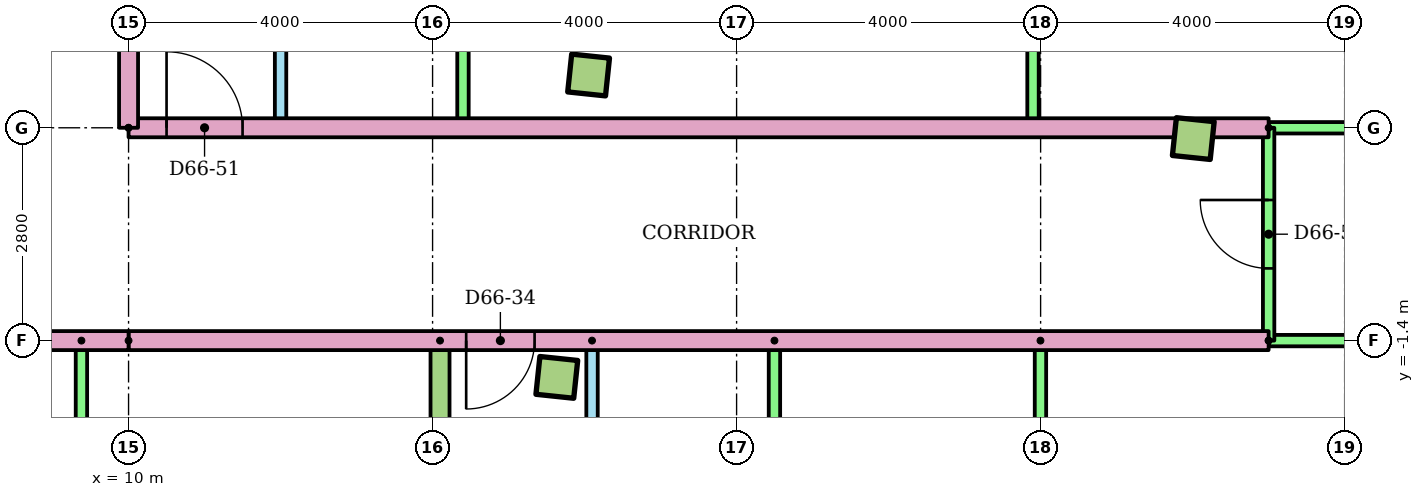
"""IFC4 building model, lengths in metres.
Left out: names, types, materials, properties, quantities, classifications, styles, units other than length and angle.
Written with IfcOpenShell. Run it as: python <this file> out.ifc"""

import sys

from ifc_helpers import new_model, si_unit, direction, frame, frame_2d, origin, origin_2d, place, context, subcontext, project, spatial, rectangle, extrude, element, fill, save


model = new_model("IFC4")
c1 = context("Model", 3, precision=1e-05, world=origin(), true_north=direction((0.0, 1.0)))
c2 = subcontext(c1, "Body", "Model", "MODEL_VIEW")
j1 = project(units=[si_unit("LENGTHUNIT", "METRE"), si_unit("PLANEANGLEUNIT", "RADIAN")], contexts=[c1])
p1 = place(None, origin())
s1 = spatial("IfcSite", under=j1, at=p1, CompositionType="ELEMENT")
p2 = place(p1, origin())
s2 = spatial("IfcBuilding", under=s1, at=p2, CompositionType="ELEMENT")
p3 = place(p2, frame((0.0, 0.0, 256.3)))
s3 = spatial("IfcBuildingStorey", under=s2, at=p3, CompositionType="ELEMENT", Elevation=256.3)
for number, where, z_axis, x_axis in (
    (1, (15.635, -1.884, 0.0), (0.0, 0.0, 1.0), (0.995, -0.105, 0.0)),
    (2, (16.053, 2.094, 0.0), (0.0, 0.0, 1.0), (0.995, -0.105, 0.0)),
    (3, (24.009, 1.258, 0.0), (0.0, 0.0, 1.0), (0.995, -0.105, 0.0)),
):
    element("IfcColumn", number, at=place(p3, frame(where, z_axis=z_axis, x_axis=x_axis)), inside=s3, PredefinedType="COLUMN", context=c2, shape_type="SweptSolid", body=[
        extrude(rectangle(XDim=0.5, YDim=0.5, at=origin_2d()), origin(), (0.0, 0.0, 1.0), 3.2),
    ])
p4 = place(p3, frame((9.38, -1.4, 0.0), z_axis=(0.0, 0.0, 1.0), x_axis=(0.0, -1.0, 0.0)))
e4 = element("IfcWall", 4, at=p4, inside=s3, PredefinedType="PARTITIONING", context=c2, shape_type="SweptSolid", body=[
    extrude(rectangle(XDim=6.075, YDim=0.15, at=frame_2d((3.037, 0.0))), origin(), (0.0, 0.0, 1.0), 2.4),
])
p5 = place(p3, frame((16.098, -1.4, 0.0), z_axis=(0.0, 0.0, 1.0), x_axis=(0.0, -1.0, 0.0)))
e5 = element("IfcWall", 5, at=p5, inside=s3, PredefinedType="PARTITIONING", context=c2, shape_type="SweptSolid", body=[
    extrude(rectangle(XDim=7.782, YDim=0.15, at=frame_2d((3.891, 0.0))), origin(), (0.0, 0.0, 1.0), 2.4),
])
p6 = place(p5, frame((1.675, 0.0, 0.0)))
e6 = element("IfcOpeningElement", 6, at=p6, cuts=e5, PredefinedType="OPENING", context=c2, shape_type="SweptSolid", body=[
    extrude(rectangle(XDim=0.9, YDim=2.1, at=frame_2d((0.45, 1.05))), frame((0.0, 0.085, 0.0), z_axis=(0.0, -1.0, 0.0), x_axis=(1.0, 0.0, 0.0)), (0.0, 0.0, 1.0), 0.17),
])
p7 = place(p5, frame((5.616, 0.0, 0.0)))
e7 = element("IfcOpeningElement", 7, at=p7, cuts=e5, PredefinedType="OPENING", context=c2, shape_type="SweptSolid", body=[
    extrude(rectangle(XDim=0.8, YDim=2.1, at=frame_2d((0.4, 1.05))), frame((0.0, 0.085, 0.0), z_axis=(0.0, -1.0, 0.0), x_axis=(1.0, 0.0, 0.0)), (0.0, 0.0, 1.0), 0.17),
])
for number, where, z_axis, x_axis in (
    (8, (18.498, -1.4, 0.0), (0.0, 0.0, 1.0), (0.0, -1.0, 0.0)),
    (9, (21.998, -1.4, 0.0), (0.0, 0.0, 1.0), (0.0, -1.0, 0.0)),
):
    element("IfcWall", number, at=place(p3, frame(where, z_axis=z_axis, x_axis=x_axis)), inside=s3, PredefinedType="PARTITIONING", context=c2, shape_type="SweptSolid", body=[
        extrude(rectangle(XDim=7.782, YDim=0.15, at=frame_2d((3.891, 0.0))), origin(), (0.0, 0.0, 1.0), 2.4),
    ])
p8 = place(p3, frame((14.098, -1.4, 0.0), z_axis=(0.0, 0.0, 1.0), x_axis=(0.0, -1.0, 0.0)))
e10 = element("IfcWall", 10, at=p8, inside=s3, PredefinedType="PARTITIONING", context=c2, shape_type="SweptSolid", body=[
    extrude(rectangle(XDim=15.013, YDim=0.25, at=frame_2d((7.506, 0.0))), origin(), (0.0, 0.0, 1.0), 2.4),
])
p9 = place(p3, frame((25.0, -1.4, 0.0), z_axis=(0.0, 0.0, 1.0), x_axis=(-1.0, 0.0, 0.0)))
e11 = element("IfcWall", 11, at=p9, inside=s3, PredefinedType="PARTITIONING", context=c2, shape_type="SweptSolid", body=[
    extrude(rectangle(XDim=15.0, YDim=0.25, at=frame_2d((7.5, 0.0))), origin(), (0.0, 0.0, 1.0), 2.4),
])
p10 = place(p9, frame((9.658, 0.0, 0.0)))
e12 = element("IfcOpeningElement", 12, at=p10, cuts=e11, PredefinedType="OPENING", context=c2, shape_type="SweptSolid", body=[
    extrude(rectangle(XDim=0.9, YDim=2.1, at=frame_2d((0.45, 1.05))), frame((0.0, 0.135, 0.0), z_axis=(0.0, -1.0, 0.0), x_axis=(1.0, 0.0, 0.0)), (0.0, 0.0, 1.0), 0.27),
])
p11 = place(p3, frame((30.798, -1.4, 0.0), z_axis=(0.0, 0.0, 1.0), x_axis=(-1.0, 0.0, 0.0)))
e13 = element("IfcWall", 13, at=p11, inside=s3, PredefinedType="PARTITIONING", context=c2, shape_type="SweptSolid", body=[
    extrude(rectangle(XDim=5.798, YDim=0.15, at=frame_2d((2.899, 0.0))), origin(), (0.0, 0.0, 1.0), 2.4),
])
p12 = place(p3, frame((12.0, 10.943, 0.0), z_axis=(0.0, 0.0, 1.0), x_axis=(0.0, -1.0, 0.0)))
e14 = element("IfcWall", 14, at=p12, inside=s3, PredefinedType="PARTITIONING", context=c2, shape_type="SweptSolid", body=[
    extrude(rectangle(XDim=9.543, YDim=0.15, at=frame_2d((4.772, 0.0))), origin(), (0.0, 0.0, 1.0), 2.4),
])
p13 = place(p12, frame((6.469, 0.0, 0.0)))
e15 = element("IfcOpeningElement", 15, at=p13, cuts=e14, PredefinedType="OPENING", context=c2, shape_type="SweptSolid", body=[
    extrude(rectangle(XDim=0.9, YDim=2.1, at=frame_2d((0.45, 1.05))), frame((0.0, 0.085, 0.0), z_axis=(0.0, -1.0, 0.0), x_axis=(1.0, 0.0, 0.0)), (0.0, 0.0, 1.0), 0.17),
])
p14 = place(p12, frame((1.747, 0.0, 0.0)))
e16 = element("IfcOpeningElement", 16, at=p14, cuts=e14, PredefinedType="OPENING", context=c2, shape_type="SweptSolid", body=[
    extrude(rectangle(XDim=0.8, YDim=2.1, at=frame_2d((0.4, 1.05))), frame((0.0, 0.085, 0.0), z_axis=(0.0, -1.0, 0.0), x_axis=(1.0, 0.0, 0.0)), (0.0, 0.0, 1.0), 0.17),
])
for number, where, z_axis, x_axis in (
    (17, (14.4, 10.943, 0.0), (0.0, 0.0, 1.0), (0.0, -1.0, 0.0)),
    (18, (21.9, 10.943, 0.0), (0.0, 0.0, 1.0), (0.0, -1.0, 0.0)),
):
    element("IfcWall", number, at=place(p3, frame(where, z_axis=z_axis, x_axis=x_axis)), inside=s3, PredefinedType="PARTITIONING", context=c2, shape_type="SweptSolid", body=[
        extrude(rectangle(XDim=9.543, YDim=0.15, at=frame_2d((4.772, 0.0))), origin(), (0.0, 0.0, 1.0), 2.4),
    ])
p15 = place(p3, frame((10.0, 1.4, 0.0)))
e19 = element("IfcWall", 19, at=p15, inside=s3, PredefinedType="PARTITIONING", context=c2, shape_type="SweptSolid", body=[
    extrude(rectangle(XDim=15.0, YDim=0.25, at=frame_2d((7.5, 0.0))), origin(), (0.0, 0.0, 1.0), 2.4),
])
p16 = place(p15, frame((0.5, 0.0, 0.0)))
e20 = element("IfcOpeningElement", 20, at=p16, cuts=e19, PredefinedType="OPENING", context=c2, shape_type="SweptSolid", body=[
    extrude(rectangle(XDim=1.0, YDim=2.1, at=frame_2d((0.5, 1.05))), frame((0.0, 0.135, 0.0), z_axis=(0.0, -1.0, 0.0), x_axis=(1.0, 0.0, 0.0)), (0.0, 0.0, 1.0), 0.27),
])
p17 = place(p3, frame((25.0, 1.4, 0.0)))
e21 = element("IfcWall", 21, at=p17, inside=s3, PredefinedType="PARTITIONING", context=c2, shape_type="SweptSolid", body=[
    extrude(rectangle(XDim=6.093, YDim=0.15, at=frame_2d((3.046, 0.0))), origin(), (0.0, 0.0, 1.0), 2.4),
])
p18 = place(p3, frame((25.0, -1.4, 0.0), z_axis=(0.0, 0.0, 1.0), x_axis=(0.0, 1.0, 0.0)))
e22 = element("IfcWall", 22, at=p18, inside=s3, PredefinedType="PARTITIONING", context=c2, shape_type="SweptSolid", body=[
    extrude(rectangle(XDim=2.8, YDim=0.15, at=frame_2d((1.4, 0.0))), origin(), (0.0, 0.0, 1.0), 2.4),
])
p19 = place(p18, frame((0.95, 0.0, 0.0)))
e23 = element("IfcOpeningElement", 23, at=p19, cuts=e22, PredefinedType="OPENING", context=c2, shape_type="SweptSolid", body=[
    extrude(rectangle(XDim=0.9, YDim=2.1, at=frame_2d((0.45, 1.05))), frame((0.0, 0.085, 0.0), z_axis=(0.0, -1.0, 0.0), x_axis=(1.0, 0.0, 0.0)), (0.0, 0.0, 1.0), 0.17),
])
p20 = place(p3, frame((10.0, -1.4, 0.0), z_axis=(0.0, 0.0, 1.0), x_axis=(-1.0, 0.0, 0.0)))
e24 = element("IfcWall", 24, at=p20, inside=s3, PredefinedType="PARTITIONING", context=c2, shape_type="SweptSolid", body=[
    extrude(rectangle(XDim=20.0, YDim=0.25, at=frame_2d((10.0, 0.0))), origin(), (0.0, 0.0, 1.0), 2.4),
])
p21 = place(p20, frame((18.27, 0.0, 0.0)))
e25 = element("IfcOpeningElement", 25, at=p21, cuts=e24, PredefinedType="OPENING", context=c2, shape_type="SweptSolid", body=[
    extrude(rectangle(XDim=1.0, YDim=2.1, at=frame_2d((0.5, 1.05))), frame((0.0, 0.135, 0.0), z_axis=(0.0, -1.0, 0.0), x_axis=(1.0, 0.0, 0.0)), (0.0, 0.0, 1.0), 0.27),
])
p22 = place(p3, frame((10.0, 1.4, 0.0), z_axis=(0.0, 0.0, 1.0), x_axis=(0.0, 1.0, 0.0)))
e26 = element("IfcWall", 26, at=p22, inside=s3, PredefinedType="PARTITIONING", context=c2, shape_type="SweptSolid", body=[
    extrude(rectangle(XDim=1.6, YDim=0.25, at=frame_2d((0.8, 0.0))), origin(), (0.0, 0.0, 1.0), 2.4),
])
p23 = place(p10, origin())
e27 = element("IfcDoor", 27, at=p23, inside=s3, OperationType="SINGLE_SWING_RIGHT", PredefinedType="DOOR", context=c2, shape_type="SweptSolid", body=[
    extrude(rectangle(XDim=0.9, YDim=2.1, at=frame_2d((0.45, 1.05))), frame((0.0, 0.025, 0.0), z_axis=(0.0, -1.0, 0.0), x_axis=(1.0, 0.0, 0.0)), (0.0, 0.0, 1.0), 0.05),
])
fill(e12, e27)
p24 = place(p16, origin())
e28 = element("IfcDoor", 28, at=p24, inside=s3, OperationType="SINGLE_SWING_LEFT", PredefinedType="DOOR", context=c2, shape_type="SweptSolid", body=[
    extrude(rectangle(XDim=1.0, YDim=2.1, at=frame_2d((0.5, 1.05))), frame((0.0, 0.025, 0.0), z_axis=(0.0, -1.0, 0.0), x_axis=(1.0, 0.0, 0.0)), (0.0, 0.0, 1.0), 0.05),
])
fill(e20, e28)
p25 = place(p19, origin())
e29 = element("IfcDoor", 29, at=p25, inside=s3, OperationType="SINGLE_SWING_RIGHT", PredefinedType="DOOR", context=c2, shape_type="SweptSolid", body=[
    extrude(rectangle(XDim=0.9, YDim=2.1, at=frame_2d((0.45, 1.05))), frame((0.0, 0.025, 0.0), z_axis=(0.0, -1.0, 0.0), x_axis=(1.0, 0.0, 0.0)), (0.0, 0.0, 1.0), 0.05),
])
fill(e23, e29)
save(model, sys.argv[1])
